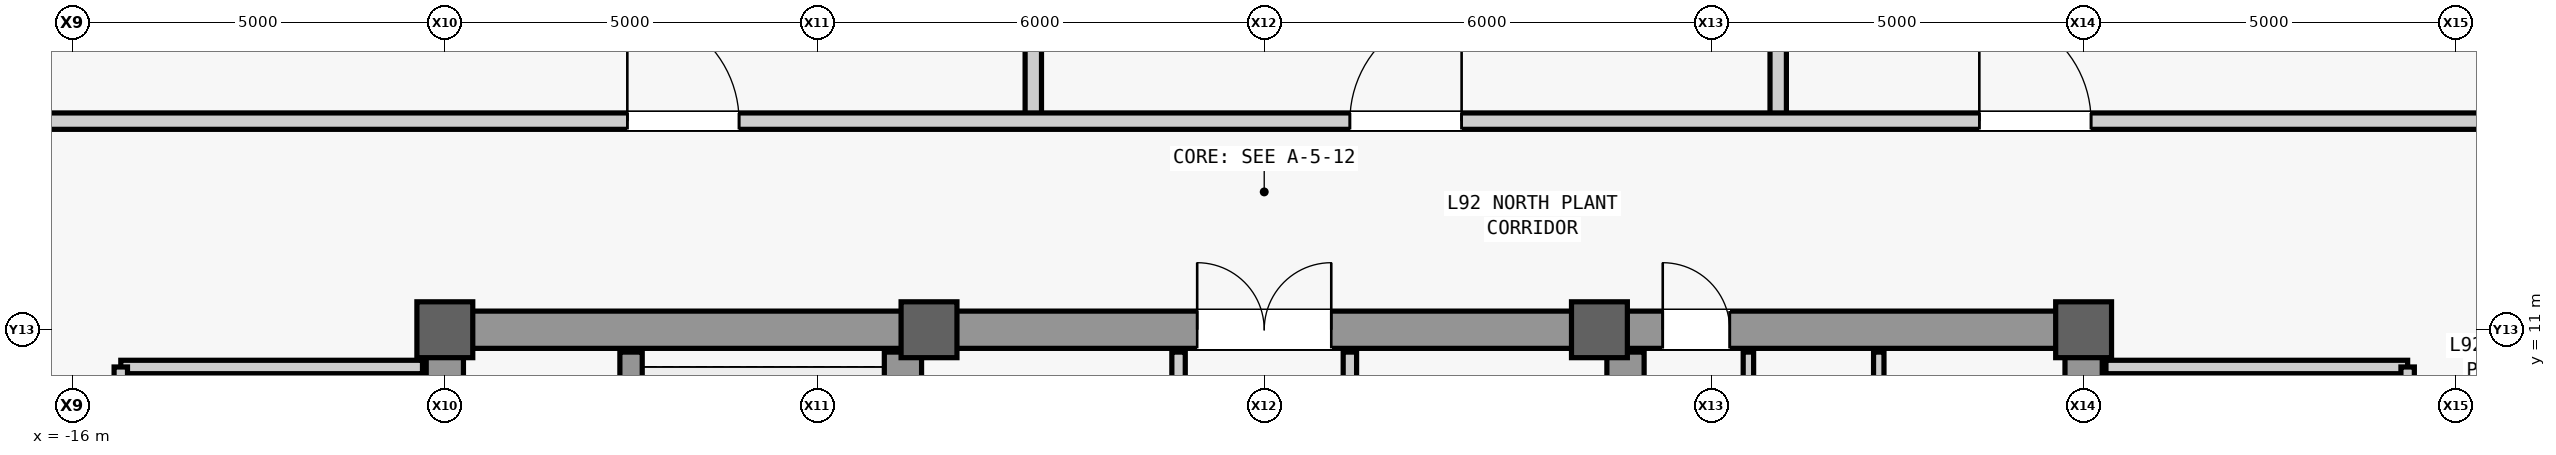
"""IFC4 building model, lengths in metres.
Left out: names, types, materials, properties, quantities, classifications, styles, units other than length and angle.
Written with IfcOpenShell. Run it as: python <this file> out.ifc"""

import sys

from ifc_helpers import new_model, si_unit, direction, frame, frame_2d, origin, origin_2d, place, context, subcontext, project, spatial, rectangle, extrude, source, transform, mapped, element, fill, save


model = new_model("IFC4")
c1 = context("Model", 3, precision=1e-05, world=origin(), true_north=direction((0.0, 1.0)))
c2 = subcontext(c1, "Body", "Model", "MODEL_VIEW")
j1 = project(units=[si_unit("LENGTHUNIT", "METRE"), si_unit("PLANEANGLEUNIT", "RADIAN")], contexts=[c1])
p1 = place(None, origin())
s1 = spatial("IfcSite", under=j1, at=p1, CompositionType="ELEMENT")
p2 = place(p1, origin())
s2 = spatial("IfcBuilding", under=s1, at=p2, CompositionType="ELEMENT")
p3 = place(p2, frame((0.0, 0.0, 389.9)))
s3 = spatial("IfcBuildingStorey", under=s2, at=p3, CompositionType="ELEMENT", Elevation=389.9)
m1 = source(origin(), c2, "Body", "SweptSolid", [
    extrude(rectangle(XDim=22.0, YDim=0.5, at=frame_2d((11.0, 0.0))), origin(), (0.0, 0.0, 1.0), 4.45),
])
p4 = place(p3, frame((-11.0, -11.0, 0.0), z_axis=(0.0, 0.0, 1.0), x_axis=(0.0, 1.0, 0.0)))
e1 = element("IfcWall", 1, at=p4, inside=s3, PredefinedType="SHEAR", context=c2, shape_type="MappedRepresentation", body=[
    mapped(m1, transform((0.0, 0.0, 0.0), scale=1.0)),
])
m2 = source(origin(), c2, "Body", "SweptSolid", [
    extrude(rectangle(XDim=1.1, YDim=2.2, at=frame_2d((0.55, 1.1))), frame((0.0, 0.26, 0.0), z_axis=(0.0, -1.0, 0.0), x_axis=(1.0, 0.0, 0.0)), (0.0, 0.0, 1.0), 0.52),
])
p5 = place(p4, frame((0.8, 0.0, 0.0)))
e2 = element("IfcOpeningElement", 2, at=p5, cuts=e1, PredefinedType="OPENING", context=c2, shape_type="MappedRepresentation", body=[
    mapped(m2, transform((0.0, 0.0, 0.0), scale=1.0)),
])
p6 = place(p4, frame((12.5, 0.0, 0.0)))
e3 = element("IfcOpeningElement", 3, at=p6, cuts=e1, PredefinedType="OPENING", context=c2, shape_type="MappedRepresentation", body=[
    mapped(m2, transform((0.0, 0.0, 0.0), scale=1.0)),
])
m3 = source(origin(), c2, "Body", "SweptSolid", [
    extrude(rectangle(XDim=0.9, YDim=2.15, at=frame_2d((0.45, 1.075))), frame((0.0, 0.26, 0.0), z_axis=(0.0, -1.0, 0.0), x_axis=(1.0, 0.0, 0.0)), (0.0, 0.0, 1.0), 0.52),
])
p7 = place(p4, frame((7.575, 0.0, 0.0)))
e4 = element("IfcOpeningElement", 4, at=p7, cuts=e1, PredefinedType="OPENING", context=c2, shape_type="MappedRepresentation", body=[
    mapped(m3, transform((0.0, 0.0, 0.0), scale=1.0)),
])
m4 = source(origin(), c2, "Body", "SweptSolid", [
    extrude(rectangle(XDim=1.3, YDim=2.3, at=frame_2d((0.65, 1.15))), frame((0.0, 0.26, 0.0), z_axis=(0.0, -1.0, 0.0), x_axis=(1.0, 0.0, 0.0)), (0.0, 0.0, 1.0), 0.52),
])
p8 = place(p4, frame((2.7, 0.0, 0.0)))
e5 = element("IfcOpeningElement", 5, at=p8, cuts=e1, PredefinedType="OPENING", context=c2, shape_type="MappedRepresentation", body=[
    mapped(m4, transform((0.0, 0.0, 0.0), scale=1.0)),
])
p9 = place(p3, frame((11.0, -11.0, 0.0), z_axis=(0.0, 0.0, 1.0), x_axis=(0.0, 1.0, 0.0)))
e6 = element("IfcWall", 6, at=p9, inside=s3, PredefinedType="SHEAR", context=c2, shape_type="MappedRepresentation", body=[
    mapped(m1, transform((0.0, 0.0, 0.0), scale=1.0)),
])
p10 = place(p9, frame((0.8, 0.0, 0.0)))
e7 = element("IfcOpeningElement", 7, at=p10, cuts=e6, PredefinedType="OPENING", context=c2, shape_type="MappedRepresentation", body=[
    mapped(m2, transform((0.0, 0.0, 0.0), scale=1.0)),
])
p11 = place(p9, frame((7.575, 0.0, 0.0)))
e8 = element("IfcOpeningElement", 8, at=p11, cuts=e6, PredefinedType="OPENING", context=c2, shape_type="MappedRepresentation", body=[
    mapped(m3, transform((0.0, 0.0, 0.0), scale=1.0)),
])
p12 = place(p9, frame((2.7, 0.0, 0.0)))
e9 = element("IfcOpeningElement", 9, at=p12, cuts=e6, PredefinedType="OPENING", context=c2, shape_type="MappedRepresentation", body=[
    mapped(m4, transform((0.0, 0.0, 0.0), scale=1.0)),
])
p13 = place(p9, frame((13.35, 0.0, 0.0)))
e10 = element("IfcOpeningElement", 10, at=p13, cuts=e6, PredefinedType="OPENING", context=c2, shape_type="MappedRepresentation", body=[
    mapped(m4, transform((0.0, 0.0, 0.0), scale=1.0)),
])
m5 = source(origin(), c2, "Body", "SweptSolid", [
    extrude(rectangle(XDim=21.4, YDim=0.5, at=frame_2d((10.7, 0.0))), origin(), (0.0, 0.0, 1.0), 4.45),
])
for number, where, z_axis, x_axis in (
    (11, (-4.85, -10.7, 0.0), (0.0, 0.0, 1.0), (0.0, 1.0, 0.0)),
    (12, (4.85, -10.7, 0.0), (0.0, 0.0, 1.0), (0.0, 1.0, 0.0)),
):
    element("IfcWall", number, at=place(p3, frame(where, z_axis=z_axis, x_axis=x_axis)), inside=s3, PredefinedType="SHEAR", context=c2, shape_type="MappedRepresentation", body=[
        mapped(m5, transform((0.0, 0.0, 0.0), scale=1.0)),
    ])
m6 = source(origin(), c2, "Body", "SweptSolid", [
    extrude(rectangle(XDim=5.9, YDim=0.5, at=frame_2d((2.95, 0.0))), origin(), (0.0, 0.0, 1.0), 4.45),
])
p14 = place(p3, frame((-10.75, 11.0, 0.0), z_axis=(0.0, 0.0, 1.0), x_axis=(1.0, 0.0, 0.0)))
e13 = element("IfcWall", 13, at=p14, inside=s3, PredefinedType="SHEAR", context=c2, shape_type="MappedRepresentation", body=[
    mapped(m6, transform((0.0, 0.0, 0.0), scale=1.0)),
])
p15 = place(p3, frame((4.85, 11.0, 0.0), z_axis=(0.0, 0.0, 1.0), x_axis=(1.0, 0.0, 0.0)))
e14 = element("IfcWall", 14, at=p15, inside=s3, PredefinedType="SHEAR", context=c2, shape_type="MappedRepresentation", body=[
    mapped(m6, transform((0.0, 0.0, 0.0), scale=1.0)),
])
p16 = place(p15, frame((0.5, 0.0, 0.0)))
e15 = element("IfcOpeningElement", 15, at=p16, cuts=e14, PredefinedType="OPENING", context=c2, shape_type="MappedRepresentation", body=[
    mapped(m3, transform((0.0, 0.0, 0.0), scale=1.0)),
])
m7 = source(origin(), c2, "Body", "SweptSolid", [
    extrude(rectangle(XDim=9.2, YDim=0.5, at=frame_2d((4.6, 0.0))), origin(), (0.0, 0.0, 1.0), 4.45),
])
p17 = place(p3, frame((-4.6, 11.0, 0.0), z_axis=(0.0, 0.0, 1.0), x_axis=(1.0, 0.0, 0.0)))
e16 = element("IfcWall", 16, at=p17, inside=s3, PredefinedType="SHEAR", context=c2, shape_type="MappedRepresentation", body=[
    mapped(m7, transform((0.0, 0.0, 0.0), scale=1.0)),
])
m8 = source(origin(), c2, "Body", "SweptSolid", [
    extrude(rectangle(XDim=1.8, YDim=2.25, at=frame_2d((0.9, 1.125))), frame((0.0, 0.26, 0.0), z_axis=(0.0, -1.0, 0.0), x_axis=(1.0, 0.0, 0.0)), (0.0, 0.0, 1.0), 0.52),
])
p18 = place(p17, frame((3.7, 0.0, 0.0)))
e17 = element("IfcOpeningElement", 17, at=p18, cuts=e16, PredefinedType="OPENING", context=c2, shape_type="MappedRepresentation", body=[
    mapped(m8, transform((0.0, 0.0, 0.0), scale=1.0)),
])
m9 = source(origin(), c2, "Body", "SweptSolid", [
    extrude(rectangle(XDim=0.75, YDim=0.75, at=origin_2d()), origin(), (0.0, 0.0, 1.0), 4.8),
])
for number, where, z_axis, x_axis in (
    (18, (-11.0, 11.0, 0.0), (0.0, 0.0, 1.0), (1.0, 0.0, 0.0)),
    (19, (-4.5, 11.0, 0.0), (0.0, 0.0, 1.0), (1.0, 0.0, 0.0)),
    (20, (4.5, 11.0, 0.0), (0.0, 0.0, 1.0), (1.0, 0.0, 0.0)),
    (21, (11.0, 11.0, 0.0), (0.0, 0.0, 1.0), (1.0, 0.0, 0.0)),
):
    element("IfcColumn", number, at=place(p3, frame(where, z_axis=z_axis, x_axis=x_axis)), inside=s3, PredefinedType="COLUMN", context=c2, shape_type="MappedRepresentation", body=[
        mapped(m9, transform((0.0, 0.0, 0.0), scale=1.0)),
    ])
m10 = source(origin(), c2, "Body", "SweptSolid", [
    extrude(rectangle(XDim=7.75, YDim=0.3, at=frame_2d((3.875, 0.0))), origin(), (0.0, 0.0, 1.0), 4.45),
])
p19 = place(p3, frame((-8.5, 2.95, 0.0), z_axis=(0.0, 0.0, 1.0), x_axis=(0.0, 1.0, 0.0)))
e22 = element("IfcWall", 22, at=p19, inside=s3, PredefinedType="SHEAR", context=c2, shape_type="MappedRepresentation", body=[
    mapped(m10, transform((0.0, 0.0, 0.0), scale=1.0)),
])
m11 = source(origin(), c2, "Body", "SweptSolid", [
    extrude(rectangle(XDim=9.4, YDim=0.14, at=frame_2d((4.7, 0.0))), origin(), (0.0, 0.0, 1.0), 4.45),
])
p20 = place(p3, frame((8.25, 1.3, 0.0), z_axis=(0.0, 0.0, 1.0), x_axis=(0.0, 1.0, 0.0)))
e23 = element("IfcWall", 23, at=p20, inside=s3, PredefinedType="PARTITIONING", context=c2, shape_type="MappedRepresentation", body=[
    mapped(m11, transform((0.0, 0.0, 0.0), scale=1.0)),
])
m12 = source(origin(), c2, "Body", "SweptSolid", [
    extrude(rectangle(XDim=5.7, YDim=0.14, at=frame_2d((2.85, 0.0))), origin(), (0.0, 0.0, 1.0), 4.45),
])
p21 = place(p3, frame((6.5, 5.0, 0.0), z_axis=(0.0, 0.0, 1.0), x_axis=(0.0, 1.0, 0.0)))
e24 = element("IfcWall", 24, at=p21, inside=s3, PredefinedType="PARTITIONING", context=c2, shape_type="MappedRepresentation", body=[
    mapped(m12, transform((0.0, 0.0, 0.0), scale=1.0)),
])
m13 = source(origin(), c2, "Body", "SweptSolid", [
    extrude(rectangle(XDim=0.9, YDim=2.15, at=frame_2d((0.45, 1.075))), frame((0.0, 0.08, 0.0), z_axis=(0.0, -1.0, 0.0), x_axis=(1.0, 0.0, 0.0)), (0.0, 0.0, 1.0), 0.16),
])
p22 = place(p21, frame((2.05, 0.0, 0.0)))
e25 = element("IfcOpeningElement", 25, at=p22, cuts=e24, PredefinedType="OPENING", context=c2, shape_type="MappedRepresentation", body=[
    mapped(m13, transform((0.0, 0.0, 0.0), scale=1.0)),
])
m14 = source(origin(), c2, "Body", "SweptSolid", [
    extrude(rectangle(XDim=4.05, YDim=0.18, at=frame_2d((2.025, 0.0))), origin(), (0.0, 0.0, 1.0), 4.45),
])
p23 = place(p3, frame((-15.35, 10.5, 0.0), z_axis=(0.0, 0.0, 1.0), x_axis=(1.0, 0.0, 0.0)))
e26 = element("IfcWall", 26, at=p23, inside=s3, PredefinedType="PARTITIONING", context=c2, shape_type="MappedRepresentation", body=[
    mapped(m14, transform((0.0, 0.0, 0.0), scale=1.0)),
])
m15 = source(origin(), c2, "Body", "SweptSolid", [
    extrude(rectangle(XDim=16.6, YDim=0.18, at=frame_2d((8.3, 0.0))), origin(), (0.0, 0.0, 1.0), 4.45),
])
p24 = place(p3, frame((-15.35, -6.1, 0.0), z_axis=(0.0, 0.0, 1.0), x_axis=(0.0, 1.0, 0.0)))
e27 = element("IfcWall", 27, at=p24, inside=s3, PredefinedType="PARTITIONING", context=c2, shape_type="MappedRepresentation", body=[
    mapped(m15, transform((0.0, 0.0, 0.0), scale=1.0)),
])
m16 = source(origin(), c2, "Body", "SweptSolid", [
    extrude(rectangle(XDim=1.8, YDim=2.25, at=frame_2d((0.9, 1.125))), frame((0.0, 0.1, 0.0), z_axis=(0.0, -1.0, 0.0), x_axis=(1.0, 0.0, 0.0)), (0.0, 0.0, 1.0), 0.2),
])
p25 = place(p24, frame((2.7, 0.0, 0.0)))
e28 = element("IfcOpeningElement", 28, at=p25, cuts=e27, PredefinedType="OPENING", context=c2, shape_type="MappedRepresentation", body=[
    mapped(m16, transform((0.0, 0.0, 0.0), scale=1.0)),
])
p26 = place(p24, frame((11.0, 0.0, 0.0)))
e29 = element("IfcOpeningElement", 29, at=p26, cuts=e27, PredefinedType="OPENING", context=c2, shape_type="MappedRepresentation", body=[
    mapped(m16, transform((0.0, 0.0, 0.0), scale=1.0)),
])
p27 = place(p3, frame((11.3, 10.5, 0.0), z_axis=(0.0, 0.0, 1.0), x_axis=(1.0, 0.0, 0.0)))
e30 = element("IfcWall", 30, at=p27, inside=s3, PredefinedType="PARTITIONING", context=c2, shape_type="MappedRepresentation", body=[
    mapped(m14, transform((0.0, 0.0, 0.0), scale=1.0)),
])
p28 = place(p3, frame((15.35, -6.1, 0.0), z_axis=(0.0, 0.0, 1.0), x_axis=(0.0, 1.0, 0.0)))
e31 = element("IfcWall", 31, at=p28, inside=s3, PredefinedType="PARTITIONING", context=c2, shape_type="MappedRepresentation", body=[
    mapped(m15, transform((0.0, 0.0, 0.0), scale=1.0)),
])
p29 = place(p28, frame((2.7, 0.0, 0.0)))
e32 = element("IfcOpeningElement", 32, at=p29, cuts=e31, PredefinedType="OPENING", context=c2, shape_type="MappedRepresentation", body=[
    mapped(m16, transform((0.0, 0.0, 0.0), scale=1.0)),
])
p30 = place(p28, frame((13.0, 0.0, 0.0)))
e33 = element("IfcOpeningElement", 33, at=p30, cuts=e31, PredefinedType="OPENING", context=c2, shape_type="MappedRepresentation", body=[
    mapped(m16, transform((0.0, 0.0, 0.0), scale=1.0)),
])
m17 = source(origin(), c2, "Body", "SweptSolid", [
    extrude(rectangle(XDim=5.4, YDim=0.18, at=frame_2d((2.7, 0.0))), origin(), (0.0, 0.0, 1.0), 4.45),
])
p31 = place(p3, frame((-1.15, 5.3, 0.0), z_axis=(0.0, 0.0, 1.0), x_axis=(0.0, 1.0, 0.0)))
e34 = element("IfcWall", 34, at=p31, inside=s3, PredefinedType="PARTITIONING", context=c2, shape_type="MappedRepresentation", body=[
    mapped(m17, transform((0.0, 0.0, 0.0), scale=1.0)),
])
m18 = source(origin(), c2, "Body", "SweptSolid", [
    extrude(rectangle(XDim=0.9, YDim=2.15, at=frame_2d((0.45, 1.075))), frame((0.0, 0.1, 0.0), z_axis=(0.0, -1.0, 0.0), x_axis=(1.0, 0.0, 0.0)), (0.0, 0.0, 1.0), 0.2),
])
p32 = place(p31, frame((0.7, 0.0, 0.0)))
e35 = element("IfcOpeningElement", 35, at=p32, cuts=e34, PredefinedType="OPENING", context=c2, shape_type="MappedRepresentation", body=[
    mapped(m18, transform((0.0, 0.0, 0.0), scale=1.0)),
])
p33 = place(p31, frame((3.4, 0.0, 0.0)))
e36 = element("IfcOpeningElement", 36, at=p33, cuts=e34, PredefinedType="OPENING", context=c2, shape_type="MappedRepresentation", body=[
    mapped(m18, transform((0.0, 0.0, 0.0), scale=1.0)),
])
p34 = place(p3, frame((1.15, 5.3, 0.0), z_axis=(0.0, 0.0, 1.0), x_axis=(0.0, 1.0, 0.0)))
e37 = element("IfcWall", 37, at=p34, inside=s3, PredefinedType="PARTITIONING", context=c2, shape_type="MappedRepresentation", body=[
    mapped(m17, transform((0.0, 0.0, 0.0), scale=1.0)),
])
p35 = place(p34, frame((0.45, 0.0, 0.0)))
e38 = element("IfcOpeningElement", 38, at=p35, cuts=e37, PredefinedType="OPENING", context=c2, shape_type="MappedRepresentation", body=[
    mapped(m18, transform((0.0, 0.0, 0.0), scale=1.0)),
])
p36 = place(p34, frame((2.25, 0.0, 0.0)))
e39 = element("IfcOpeningElement", 39, at=p36, cuts=e37, PredefinedType="OPENING", context=c2, shape_type="MappedRepresentation", body=[
    mapped(m18, transform((0.0, 0.0, 0.0), scale=1.0)),
])
p37 = place(p34, frame((4.05, 0.0, 0.0)))
e40 = element("IfcOpeningElement", 40, at=p37, cuts=e37, PredefinedType="OPENING", context=c2, shape_type="MappedRepresentation", body=[
    mapped(m18, transform((0.0, 0.0, 0.0), scale=1.0)),
])
m19 = source(origin(), c2, "Body", "SweptSolid", [
    extrude(rectangle(XDim=10.2, YDim=0.22, at=frame_2d((5.1, 0.0))), origin(), (0.0, 0.0, 1.0), 4.45),
])
for number, where, z_axis, x_axis in (
    (41, (-3.1, 13.8, 0.0), (0.0, 0.0, 1.0), (0.0, 1.0, 0.0)),
    (42, (6.9, 13.8, 0.0), (0.0, 0.0, 1.0), (0.0, 1.0, 0.0)),
):
    element("IfcWall", number, at=place(p3, frame(where, z_axis=z_axis, x_axis=x_axis)), inside=s3, PredefinedType="PARTITIONING", context=c2, shape_type="MappedRepresentation", body=[
        mapped(m19, transform((0.0, 0.0, 0.0), scale=1.0)),
    ])
m20 = source(origin(), c2, "Body", "SweptSolid", [
    extrude(rectangle(XDim=36.0, YDim=0.22, at=frame_2d((18.0, 0.0))), origin(), (0.0, 0.0, 1.0), 4.45),
])
p38 = place(p3, frame((-18.0, 13.8, 0.0), z_axis=(0.0, 0.0, 1.0), x_axis=(1.0, 0.0, 0.0)))
e43 = element("IfcWall", 43, at=p38, inside=s3, PredefinedType="PARTITIONING", context=c2, shape_type="MappedRepresentation", body=[
    mapped(m20, transform((0.0, 0.0, 0.0), scale=1.0)),
])
m21 = source(origin(), c2, "Body", "SweptSolid", [
    extrude(rectangle(XDim=1.5, YDim=2.3, at=frame_2d((0.75, 1.15))), frame((0.0, 0.12, 0.0), z_axis=(0.0, -1.0, 0.0), x_axis=(1.0, 0.0, 0.0)), (0.0, 0.0, 1.0), 0.24),
])
p39 = place(p38, frame((9.45, 0.0, 0.0)))
e44 = element("IfcOpeningElement", 44, at=p39, cuts=e43, PredefinedType="OPENING", context=c2, shape_type="MappedRepresentation", body=[
    mapped(m21, transform((0.0, 0.0, 0.0), scale=1.0)),
])
p40 = place(p38, frame((19.15, 0.0, 0.0)))
e45 = element("IfcOpeningElement", 45, at=p40, cuts=e43, PredefinedType="OPENING", context=c2, shape_type="MappedRepresentation", body=[
    mapped(m21, transform((0.0, 0.0, 0.0), scale=1.0)),
])
p41 = place(p38, frame((27.6, 0.0, 0.0)))
e46 = element("IfcOpeningElement", 46, at=p41, cuts=e43, PredefinedType="OPENING", context=c2, shape_type="MappedRepresentation", body=[
    mapped(m21, transform((0.0, 0.0, 0.0), scale=1.0)),
])
m22 = source(origin(), c2, "Body", "SweptSolid", [
    extrude(rectangle(XDim=0.9, YDim=2.15, at=frame_2d((0.45, 1.075))), frame((0.0, 0.025, 0.0), z_axis=(0.0, -1.0, 0.0), x_axis=(1.0, 0.0, 0.0)), (0.0, 0.0, 1.0), 0.05),
])
p42 = place(p16, origin())
e47 = element("IfcDoor", 47, at=p42, inside=s3, OperationType="SINGLE_SWING_LEFT", PredefinedType="DOOR", context=c2, shape_type="MappedRepresentation", body=[
    mapped(m22, transform((0.0, 0.0, 0.0), scale=1.0)),
])
fill(e15, e47)
m23 = source(origin(), c2, "Body", "SweptSolid", [
    extrude(rectangle(XDim=1.8, YDim=2.25, at=frame_2d((0.9, 1.125))), frame((0.0, 0.025, 0.0), z_axis=(0.0, -1.0, 0.0), x_axis=(1.0, 0.0, 0.0)), (0.0, 0.0, 1.0), 0.05),
])
p43 = place(p18, origin())
e48 = element("IfcDoor", 48, at=p43, inside=s3, OperationType="SINGLE_SWING_RIGHT", PredefinedType="DOOR", context=c2, shape_type="MappedRepresentation", body=[
    mapped(m23, transform((0.0, 0.0, 0.0), scale=1.0)),
])
fill(e17, e48)
m24 = source(origin(), c2, "Body", "SweptSolid", [
    extrude(rectangle(XDim=1.5, YDim=2.3, at=frame_2d((0.75, 1.15))), frame((0.0, 0.025, 0.0), z_axis=(0.0, -1.0, 0.0), x_axis=(1.0, 0.0, 0.0)), (0.0, 0.0, 1.0), 0.05),
])
p44 = place(p39, origin())
e49 = element("IfcDoor", 49, at=p44, inside=s3, OperationType="SINGLE_SWING_LEFT", PredefinedType="DOOR", context=c2, shape_type="MappedRepresentation", body=[
    mapped(m24, transform((0.0, 0.0, 0.0), scale=1.0)),
])
fill(e44, e49)
p45 = place(p40, origin())
e50 = element("IfcDoor", 50, at=p45, inside=s3, OperationType="SINGLE_SWING_RIGHT", PredefinedType="DOOR", context=c2, shape_type="MappedRepresentation", body=[
    mapped(m24, transform((0.0, 0.0, 0.0), scale=1.0)),
])
fill(e45, e50)
p46 = place(p41, origin())
e51 = element("IfcDoor", 51, at=p46, inside=s3, OperationType="SINGLE_SWING_LEFT", PredefinedType="DOOR", context=c2, shape_type="MappedRepresentation", body=[
    mapped(m24, transform((0.0, 0.0, 0.0), scale=1.0)),
])
fill(e46, e51)
save(model, sys.argv[1])
